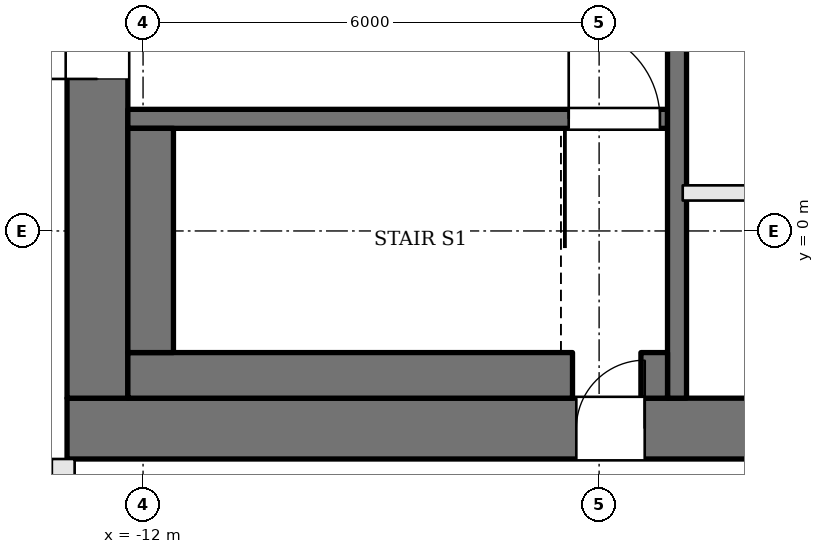
"""IFC4 building model, lengths in metres.
Left out: names, types, materials, properties, quantities, classifications, styles, units other than length and angle.
Written with IfcOpenShell. Run it as: python <this file> out.ifc"""

import sys

from ifc_helpers import new_model, si_unit, direction, frame, frame_2d, origin, place, context, subcontext, project, spatial, rectangle, extrude, element, fill, save


model = new_model("IFC4")
c1 = context("Model", 3, precision=1e-05, world=origin(), true_north=direction((0.0, 1.0)))
c2 = subcontext(c1, "Body", "Model", "MODEL_VIEW")
j1 = project(units=[si_unit("LENGTHUNIT", "METRE"), si_unit("PLANEANGLEUNIT", "RADIAN")], contexts=[c1])
p1 = place(None, origin())
s1 = spatial("IfcSite", under=j1, at=p1, CompositionType="ELEMENT")
p2 = place(p1, origin())
s2 = spatial("IfcBuilding", under=s1, at=p2, CompositionType="ELEMENT")
p3 = place(p2, frame((0.0, 0.0, 316.2)))
s3 = spatial("IfcBuildingStorey", under=s2, at=p3, CompositionType="ELEMENT", Elevation=316.2)
p4 = place(p3, frame((-13.0, -2.6, 0.0), z_axis=(0.0, 0.0, 1.0), x_axis=(1.0, 0.0, 0.0)))
e1 = element("IfcWall", 1, at=p4, inside=s3, PredefinedType="SHEAR", context=c2, shape_type="SweptSolid", body=[
    extrude(rectangle(XDim=26.0, YDim=0.8, at=frame_2d((13.0, 0.0))), origin(), (0.0, 0.0, 1.0), 4.0),
])
p5 = place(p4, frame((9.125, 0.0, 0.0)))
e2 = element("IfcOpeningElement", 2, at=p5, cuts=e1, PredefinedType="OPENING", context=c2, shape_type="SweptSolid", body=[
    extrude(rectangle(XDim=1.2, YDim=2.1, at=frame_2d((0.6, 1.05))), frame((0.0, 0.41, 0.0), z_axis=(0.0, -1.0, 0.0), x_axis=(1.0, 0.0, 0.0)), (0.0, 0.0, 1.0), 0.82),
])
p6 = place(p4, frame((12.375, 0.0, 0.0)))
e3 = element("IfcOpeningElement", 3, at=p6, cuts=e1, PredefinedType="OPENING", context=c2, shape_type="SweptSolid", body=[
    extrude(rectangle(XDim=1.2, YDim=2.1, at=frame_2d((0.6, 1.05))), frame((0.0, 0.41, 0.0), z_axis=(0.0, -1.0, 0.0), x_axis=(1.0, 0.0, 0.0)), (0.0, 0.0, 1.0), 0.82),
])
p7 = place(p4, frame((15.9, 0.0, 0.0)))
e4 = element("IfcOpeningElement", 4, at=p7, cuts=e1, PredefinedType="OPENING", context=c2, shape_type="SweptSolid", body=[
    extrude(rectangle(XDim=0.7, YDim=2.1, at=frame_2d((0.35, 1.05))), frame((0.0, 0.41, 0.0), z_axis=(0.0, -1.0, 0.0), x_axis=(1.0, 0.0, 0.0)), (0.0, 0.0, 1.0), 0.82),
])
p8 = place(p4, frame((6.7, 0.0, 0.0)))
e5 = element("IfcOpeningElement", 5, at=p8, cuts=e1, PredefinedType="OPENING", context=c2, shape_type="SweptSolid", body=[
    extrude(rectangle(XDim=0.9, YDim=2.1, at=frame_2d((0.45, 1.05))), frame((0.0, 0.41, 0.0), z_axis=(0.0, -1.0, 0.0), x_axis=(1.0, 0.0, 0.0)), (0.0, 0.0, 1.0), 0.82),
])
p9 = place(p3, frame((-12.6, -2.2, 0.0), z_axis=(0.0, 0.0, 1.0), x_axis=(0.0, 1.0, 0.0)))
e6 = element("IfcWall", 6, at=p9, inside=s3, PredefinedType="SHEAR", context=c2, shape_type="SweptSolid", body=[
    extrude(rectangle(XDim=13.4, YDim=0.8, at=frame_2d((6.7, 0.0))), origin(), (0.0, 0.0, 1.0), 4.0),
])
p10 = place(p9, frame((4.2, 0.0, 0.0)))
e7 = element("IfcOpeningElement", 7, at=p10, cuts=e6, PredefinedType="OPENING", context=c2, shape_type="SweptSolid", body=[
    extrude(rectangle(XDim=1.8, YDim=2.1, at=frame_2d((0.9, 1.05))), frame((0.0, 0.41, 0.0), z_axis=(0.0, -1.0, 0.0), x_axis=(1.0, 0.0, 0.0)), (0.0, 0.0, 1.0), 0.82),
])
p11 = place(p3, frame((-12.2, 1.475, 0.0), z_axis=(0.0, 0.0, 1.0), x_axis=(1.0, 0.0, 0.0)))
e8 = element("IfcWall", 8, at=p11, inside=s3, PredefinedType="SOLIDWALL", context=c2, shape_type="SweptSolid", body=[
    extrude(rectangle(XDim=7.1, YDim=0.25, at=frame_2d((3.55, 0.0))), origin(), (0.0, 0.0, 1.0), 3.28),
])
p12 = place(p11, frame((5.8, 0.0, 0.0)))
e9 = element("IfcOpeningElement", 9, at=p12, cuts=e8, PredefinedType="OPENING", context=c2, shape_type="SweptSolid", body=[
    extrude(rectangle(XDim=1.2, YDim=2.1, at=frame_2d((0.6, 1.05))), frame((0.0, 0.135, 0.0), z_axis=(0.0, -1.0, 0.0), x_axis=(1.0, 0.0, 0.0)), (0.0, 0.0, 1.0), 0.27),
])
p13 = place(p3, frame((-4.975, -2.2, 0.0), z_axis=(0.0, 0.0, 1.0), x_axis=(0.0, 1.0, 0.0)))
e10 = element("IfcWall", 10, at=p13, inside=s3, PredefinedType="SOLIDWALL", context=c2, shape_type="SweptSolid", body=[
    extrude(rectangle(XDim=13.4, YDim=0.25, at=frame_2d((6.7, 0.0))), origin(), (0.0, 0.0, 1.0), 3.28),
])
p14 = place(p13, frame((5.25, 0.0, 0.0)))
e11 = element("IfcOpeningElement", 11, at=p14, cuts=e10, PredefinedType="OPENING", context=c2, shape_type="SweptSolid", body=[
    extrude(rectangle(XDim=1.2, YDim=2.1, at=frame_2d((0.6, 1.05))), frame((0.0, 0.135, 0.0), z_axis=(0.0, -1.0, 0.0), x_axis=(1.0, 0.0, 0.0)), (0.0, 0.0, 1.0), 0.27),
])
p15 = place(p3, frame((-12.2, -1.9, 0.0), z_axis=(0.0, 0.0, 1.0), x_axis=(1.0, 0.0, 0.0)))
e12 = element("IfcWall", 12, at=p15, inside=s3, PredefinedType="SOLIDWALL", context=c2, shape_type="SweptSolid", body=[
    extrude(rectangle(XDim=5.85, YDim=0.6, at=frame_2d((2.925, 0.0))), origin(), (0.0, 0.0, 1.0), 3.28),
])
p16 = place(p3, frame((-5.275, -2.2, 0.0), z_axis=(0.0, 0.0, 1.0), x_axis=(0.0, 1.0, 0.0)))
e13 = element("IfcWall", 13, at=p16, inside=s3, PredefinedType="SOLIDWALL", context=c2, shape_type="SweptSolid", body=[
    extrude(rectangle(XDim=0.6, YDim=0.35, at=frame_2d((0.3, 0.0))), origin(), (0.0, 0.0, 1.0), 3.28),
])
p17 = place(p3, frame((-11.9, -1.6, 0.0), z_axis=(0.0, 0.0, 1.0), x_axis=(0.0, 1.0, 0.0)))
e14 = element("IfcWall", 14, at=p17, inside=s3, PredefinedType="SOLIDWALL", context=c2, shape_type="SweptSolid", body=[
    extrude(rectangle(XDim=2.95, YDim=0.6, at=frame_2d((1.475, 0.0))), origin(), (0.0, 0.0, 1.0), 3.28),
])
p18 = place(p3, frame((-4.9, 0.5, 0.0), z_axis=(0.0, 0.0, 1.0), x_axis=(1.0, 0.0, 0.0)))
e15 = element("IfcWall", 15, at=p18, inside=s3, PredefinedType="SOLIDWALL", context=c2, shape_type="SweptSolid", body=[
    extrude(rectangle(XDim=9.8, YDim=0.2, at=frame_2d((4.9, 0.0))), origin(), (0.0, 0.0, 1.0), 3.28),
])
p19 = place(p3, frame((-13.05, -8.0, 0.0), z_axis=(0.0, 0.0, 1.0), x_axis=(0.0, 1.0, 0.0)))
e16 = element("IfcWall", 16, at=p19, inside=s3, PredefinedType="SOLIDWALL", context=c2, shape_type="SweptSolid", body=[
    extrude(rectangle(XDim=5.0, YDim=0.3, at=frame_2d((2.5, 0.0))), origin(), (0.0, 0.0, 1.0), 3.484),
])
p20 = place(p10, origin())
e17 = element("IfcDoor", 17, at=p20, inside=s3, OperationType="DOUBLE_DOOR_SINGLE_SWING", PredefinedType="DOOR", context=c2, shape_type="SweptSolid", body=[
    extrude(rectangle(XDim=1.8, YDim=2.1, at=frame_2d((0.9, 1.05))), frame((0.0, 0.025, 0.0), z_axis=(0.0, -1.0, 0.0), x_axis=(1.0, 0.0, 0.0)), (0.0, 0.0, 1.0), 0.05),
])
fill(e7, e17)
p21 = place(p12, origin())
e18 = element("IfcDoor", 18, at=p21, inside=s3, OperationType="SINGLE_SWING_LEFT", PredefinedType="DOOR", context=c2, shape_type="SweptSolid", body=[
    extrude(rectangle(XDim=1.2, YDim=2.1, at=frame_2d((0.6, 1.05))), frame((0.0, 0.025, 0.0), z_axis=(0.0, -1.0, 0.0), x_axis=(1.0, 0.0, 0.0)), (0.0, 0.0, 1.0), 0.05),
])
fill(e9, e18)
p22 = place(p8, origin())
e19 = element("IfcDoor", 19, at=p22, inside=s3, OperationType="SINGLE_SWING_RIGHT", PredefinedType="DOOR", context=c2, shape_type="SweptSolid", body=[
    extrude(rectangle(XDim=0.9, YDim=2.1, at=frame_2d((0.45, 1.05))), frame((0.0, 0.025, 0.0), z_axis=(0.0, -1.0, 0.0), x_axis=(1.0, 0.0, 0.0)), (0.0, 0.0, 1.0), 0.05),
])
fill(e5, e19)
save(model, sys.argv[1])
